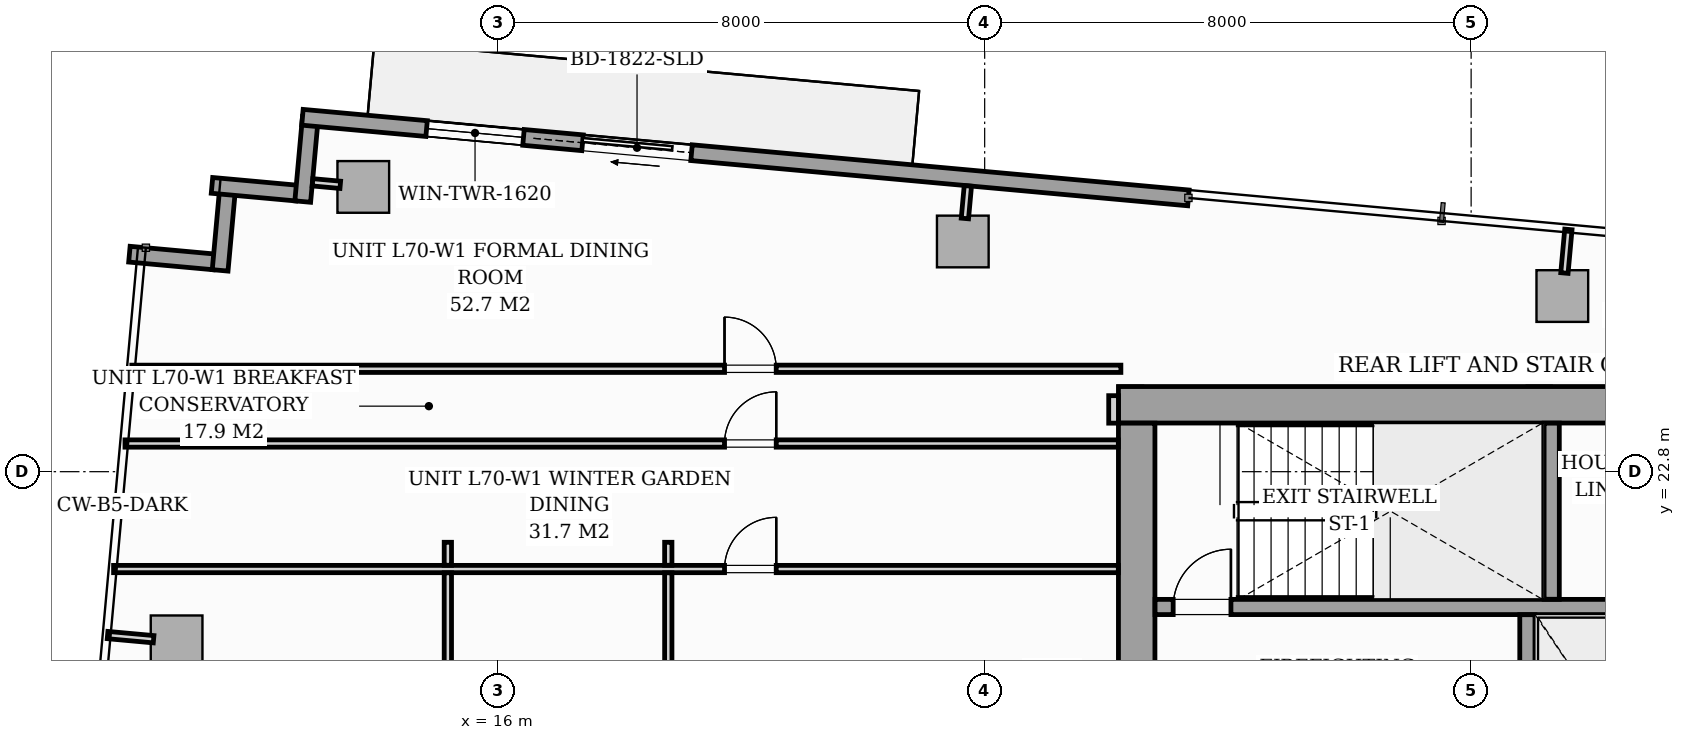
"""IFC4 building model, lengths in metres.
Left out: names, types, materials, properties, quantities, classifications, styles, units other than length and angle.
Written with IfcOpenShell. Run it as: python <this file> out.ifc"""

import sys

from ifc_helpers import new_model, si_unit, direction, frame, frame_2d, origin, origin_2d, place, context, subcontext, project, spatial, rectangle, i_section, extrude, source, transform, mapped, element, fill, save


model = new_model("IFC4")
c1 = context("Model", 3, precision=1e-05, world=origin(), true_north=direction((0.0, 1.0)))
c2 = subcontext(c1, "Body", "Model", "MODEL_VIEW")
j1 = project(units=[si_unit("LENGTHUNIT", "METRE"), si_unit("PLANEANGLEUNIT", "RADIAN")], contexts=[c1])
p1 = place(None, origin())
s1 = spatial("IfcSite", under=j1, at=p1, CompositionType="ELEMENT")
p2 = place(p1, origin())
s2 = spatial("IfcBuilding", under=s1, at=p2, CompositionType="ELEMENT")
p3 = place(p2, frame((0.0, 0.0, 243.0)))
s3 = spatial("IfcBuildingStorey", under=s2, at=p3, CompositionType="ELEMENT", Elevation=243.0)
m1 = source(origin(), c2, "Body", "SweptSolid", [
    extrude(i_section(OverallWidth=0.409, OverallDepth=0.425, WebThickness=0.033, FlangeThickness=0.052, FilletRadius=0.018, at=origin_2d()), origin(), (0.0, 0.0, 1.0), 3.296),
])
for number, where, z_axis, x_axis in (
    (1, (26.4, 24.0, 0.002), (0.0, 0.0, 1.0), (1.0, 0.0, 0.0)),
    (2, (33.12, 24.0, 0.002), (0.0, 0.0, 1.0), (1.0, 0.0, 0.0)),
):
    element("IfcColumn", number, at=place(p3, frame(where, z_axis=z_axis, x_axis=x_axis)), inside=s3, PredefinedType="PILASTER", context=c2, shape_type="MappedRepresentation", body=[
        mapped(m1, transform((0.0, 0.0, 0.0), scale=1.0)),
    ])
m2 = source(origin(), c2, "Body", "SweptSolid", [
    extrude(rectangle(XDim=0.85, YDim=0.85, at=origin_2d()), origin(), (0.0, 0.0, 1.0), 3.296),
])
for number, where, z_axis, x_axis in (
    (3, (13.781, 27.483, 0.002), (0.0, 0.0, 1.0), (0.996, -0.091, 0.0)),
    (4, (23.64, 26.585, 0.002), (0.0, 0.0, 1.0), (0.996, -0.091, 0.0)),
    (5, (33.5, 25.688, 0.002), (0.0, 0.0, 1.0), (0.996, -0.091, 0.0)),
    (6, (10.711, 20.01, 0.002), (0.0, 0.0, 1.0), (0.996, -0.091, 0.0)),
):
    element("IfcColumn", number, at=place(p3, frame(where, z_axis=z_axis, x_axis=x_axis)), inside=s3, PredefinedType="COLUMN", context=c2, shape_type="MappedRepresentation", body=[
        mapped(m2, transform((0.0, 0.0, 0.0), scale=1.0)),
    ])
for number, where, z_axis, x_axis in (
    (7, (9.935, 26.377, 0.0), (0.0, 0.0, 1.0), (0.996, -0.091, 0.0)),
    (8, (11.427, 26.111, 0.0), (0.0, 0.0, 1.0), (0.091, 0.996, 0.0)),
):
    element("IfcWall", number, at=place(p3, frame(where, z_axis=z_axis, x_axis=x_axis)), inside=s3, PredefinedType="STANDARD", context=c2, shape_type="SweptSolid", body=[
        extrude(rectangle(XDim=1.395, YDim=0.26, at=frame_2d((0.698, 0.0))), origin(), (0.0, 0.0, 1.0), 3.04),
    ])
p4 = place(p3, frame((11.293, 27.508, 0.0), z_axis=(0.0, 0.0, 1.0), x_axis=(0.995883159782, -0.090646191665, 0.0)))
e9 = element("IfcWall", 9, at=p4, inside=s3, PredefinedType="STANDARD", context=c2, shape_type="SweptSolid", body=[
    extrude(rectangle(XDim=1.395, YDim=0.26, at=frame_2d((0.698, 0.0))), origin(), (0.0, 0.0, 1.0), 3.04),
])
p5 = place(p3, frame((12.785, 27.242, 0.0), z_axis=(0.0, 0.0, 1.0), x_axis=(0.090472632758, 0.995898942023, 0.0)))
e10 = element("IfcWall", 10, at=p5, inside=s3, PredefinedType="STANDARD", context=c2, shape_type="SweptSolid", body=[
    extrude(rectangle(XDim=1.395, YDim=0.26, at=frame_2d((0.698, 0.0))), origin(), (0.0, 0.0, 1.0), 3.04),
])
p6 = place(p3, frame((12.781, 28.628, 0.0), z_axis=(0.0, 0.0, 1.0), x_axis=(0.995884584572, -0.090630536861, 0.0)))
e11 = element("IfcWall", 11, at=p6, inside=s3, PredefinedType="STANDARD", context=c2, shape_type="SweptSolid", body=[
    extrude(rectangle(XDim=14.63, YDim=0.26, at=frame_2d((7.315, 0.0))), origin(), (0.0, 0.0, 1.0), 3.04),
])
p7 = place(p6, frame((4.625, 0.0, 0.0)))
e12 = element("IfcOpeningElement", 12, at=p7, cuts=e11, PredefinedType="OPENING", context=c2, shape_type="SweptSolid", body=[
    extrude(rectangle(XDim=1.8, YDim=2.06, at=frame_2d((0.9, 1.03))), frame((0.0, 0.14, 0.0), z_axis=(0.0, -1.0, 0.0), x_axis=(1.0, 0.0, 0.0)), (0.0, 0.0, 1.0), 0.28),
])
p8 = place(p6, frame((2.05, 0.0, 0.65)))
e13 = element("IfcOpeningElement", 13, at=p8, cuts=e11, PredefinedType="OPENING", context=c2, shape_type="SweptSolid", body=[
    extrude(rectangle(XDim=1.6, YDim=1.5, at=frame_2d((0.8, 0.75))), frame((0.0, 0.14, 0.0), z_axis=(0.0, -1.0, 0.0), x_axis=(1.0, 0.0, 0.0)), (0.0, 0.0, 1.0), 0.28),
])
p9 = place(p3, frame((26.2, 23.9, 0.0), z_axis=(0.0, 0.0, 1.0), x_axis=(1.0, 0.0, 0.0)))
e14 = element("IfcWall", 14, at=p9, inside=s3, PredefinedType="SHEAR", context=c2, shape_type="SweptSolid", body=[
    extrude(rectangle(XDim=19.6, YDim=0.6, at=frame_2d((9.8, 0.0))), origin(), (0.0, 0.0, 1.0), 3.3),
])
p10 = place(p3, frame((26.5, 17.802, 0.0), z_axis=(0.0, 0.0, 1.0), x_axis=(0.0, 1.0, 0.0)))
e15 = element("IfcWall", 15, at=p10, inside=s3, PredefinedType="SHEAR", context=c2, shape_type="SweptSolid", body=[
    extrude(rectangle(XDim=5.796, YDim=0.6, at=frame_2d((2.898, 0.0))), origin(), (0.0, 0.0, 1.0), 3.3),
])
p11 = place(p3, frame((26.802, 20.575, 0.0), z_axis=(0.0, 0.0, 1.0), x_axis=(1.0, 0.0, 0.0)))
e16 = element("IfcWall", 16, at=p11, inside=s3, PredefinedType="SOLIDWALL", context=c2, shape_type="SweptSolid", body=[
    extrude(rectangle(XDim=8.148, YDim=0.25, at=frame_2d((4.074, 0.0))), origin(), (0.0, 0.0, 1.0), 3.3),
])
p12 = place(p11, frame((0.298, 0.0, 0.0)))
e17 = element("IfcOpeningElement", 17, at=p12, cuts=e16, PredefinedType="OPENING", context=c2, shape_type="SweptSolid", body=[
    extrude(rectangle(XDim=0.95, YDim=2.06, at=frame_2d((0.475, 1.03))), frame((0.0, 0.135, 0.0), z_axis=(0.0, -1.0, 0.0), x_axis=(1.0, 0.0, 0.0)), (0.0, 0.0, 1.0), 0.27),
])
p13 = place(p3, frame((33.325, 20.702, 0.0), z_axis=(0.0, 0.0, 1.0), x_axis=(0.0, 1.0, 0.0)))
e18 = element("IfcWall", 18, at=p13, inside=s3, PredefinedType="SOLIDWALL", context=c2, shape_type="SweptSolid", body=[
    extrude(rectangle(XDim=2.896, YDim=0.25, at=frame_2d((1.448, 0.0))), origin(), (0.0, 0.0, 1.0), 3.3),
])
p14 = place(p3, frame((32.925, 17.802, 0.0), z_axis=(0.0, 0.0, 1.0), x_axis=(0.0, 1.0, 0.0)))
e19 = element("IfcWall", 19, at=p14, inside=s3, PredefinedType="SOLIDWALL", context=c2, shape_type="SweptSolid", body=[
    extrude(rectangle(XDim=2.646, YDim=0.25, at=frame_2d((1.323, 0.0))), origin(), (0.0, 0.0, 1.0), 3.3),
])
p15 = place(p14, frame((0.548, 0.0, 0.0)))
e20 = element("IfcOpeningElement", 20, at=p15, cuts=e19, PredefinedType="OPENING", context=c2, shape_type="SweptSolid", body=[
    extrude(rectangle(XDim=1.1, YDim=2.08, at=frame_2d((0.55, 1.04))), frame((0.0, 0.135, 0.0), z_axis=(0.0, -1.0, 0.0), x_axis=(1.0, 0.0, 0.0)), (0.0, 0.0, 1.0), 0.27),
])
p16 = place(p3, frame((26.12, 23.598, 0.0), z_axis=(0.0, 0.0, 1.0), x_axis=(0.0, 1.0, 0.0)))
e21 = element("IfcWall", 21, at=p16, inside=s3, PredefinedType="PARTITIONING", context=c2, shape_type="SweptSolid", body=[
    extrude(rectangle(XDim=0.452, YDim=0.16, at=frame_2d((0.226, 0.0))), origin(), (0.0, 0.0, 1.0), 3.04),
])
p17 = place(p3, frame((9.975, 24.492, 0.0), z_axis=(0.0, 0.0, 1.0), x_axis=(1.0, 0.0, 0.0)))
e22 = element("IfcWall", 22, at=p17, inside=s3, PredefinedType="PARTITIONING", context=c2, shape_type="SweptSolid", body=[
    extrude(rectangle(XDim=16.265, YDim=0.12, at=frame_2d((8.133, 0.0))), origin(), (0.0, 0.0, 1.0), 3.04),
])
p18 = place(p17, frame((9.748, 0.0, 0.0)))
e23 = element("IfcOpeningElement", 23, at=p18, cuts=e22, PredefinedType="OPENING", context=c2, shape_type="SweptSolid", body=[
    extrude(rectangle(XDim=0.85, YDim=2.05, at=frame_2d((0.425, 1.025))), frame((0.0, 0.07, 0.0), z_axis=(0.0, -1.0, 0.0), x_axis=(1.0, 0.0, 0.0)), (0.0, 0.0, 1.0), 0.14),
])
p19 = place(p3, frame((9.863, 23.263, 0.0), z_axis=(0.0, 0.0, 1.0), x_axis=(1.0, 0.0, 0.0)))
e24 = element("IfcWall", 24, at=p19, inside=s3, PredefinedType="PARTITIONING", context=c2, shape_type="SweptSolid", body=[
    extrude(rectangle(XDim=16.335, YDim=0.12, at=frame_2d((8.168, 0.0))), origin(), (0.0, 0.0, 1.0), 3.04),
])
p20 = place(p19, frame((9.859, 0.0, 0.0)))
e25 = element("IfcOpeningElement", 25, at=p20, cuts=e24, PredefinedType="OPENING", context=c2, shape_type="SweptSolid", body=[
    extrude(rectangle(XDim=0.85, YDim=2.05, at=frame_2d((0.425, 1.025))), frame((0.0, 0.07, 0.0), z_axis=(0.0, -1.0, 0.0), x_axis=(1.0, 0.0, 0.0)), (0.0, 0.0, 1.0), 0.14),
])
p21 = place(p3, frame((9.675, 21.199, 0.0), z_axis=(0.0, 0.0, 1.0), x_axis=(1.0, 0.0, 0.0)))
e26 = element("IfcWall", 26, at=p21, inside=s3, PredefinedType="PARTITIONING", context=c2, shape_type="SweptSolid", body=[
    extrude(rectangle(XDim=16.523, YDim=0.12, at=frame_2d((8.262, 0.0))), origin(), (0.0, 0.0, 1.0), 3.04),
])
p22 = place(p21, frame((10.047, 0.0, 0.0)))
e27 = element("IfcOpeningElement", 27, at=p22, cuts=e26, PredefinedType="OPENING", context=c2, shape_type="SweptSolid", body=[
    extrude(rectangle(XDim=0.85, YDim=2.05, at=frame_2d((0.425, 1.025))), frame((0.0, 0.07, 0.0), z_axis=(0.0, -1.0, 0.0), x_axis=(1.0, 0.0, 0.0)), (0.0, 0.0, 1.0), 0.14),
])
p23 = place(p3, frame((15.172, 11.902, 0.0), z_axis=(0.0, 0.0, 1.0), x_axis=(0.0, 1.0, 0.0)))
e28 = element("IfcWall", 28, at=p23, inside=s3, PredefinedType="PARTITIONING", context=c2, shape_type="SweptSolid", body=[
    extrude(rectangle(XDim=9.235, YDim=0.12, at=frame_2d((4.617, 0.0))), origin(), (0.0, 0.0, 1.0), 3.04),
])
p24 = place(p23, frame((4.193, 0.0, 0.0)))
e29 = element("IfcOpeningElement", 29, at=p24, cuts=e28, PredefinedType="OPENING", context=c2, shape_type="SweptSolid", body=[
    extrude(rectangle(XDim=0.85, YDim=2.05, at=frame_2d((0.425, 1.025))), frame((0.0, 0.07, 0.0), z_axis=(0.0, -1.0, 0.0), x_axis=(1.0, 0.0, 0.0)), (0.0, 0.0, 1.0), 0.14),
])
p25 = place(p3, frame((15.172, 21.261, 0.0), z_axis=(0.0, 0.0, 1.0), x_axis=(0.0, 1.0, 0.0)))
e30 = element("IfcWall", 30, at=p25, inside=s3, PredefinedType="PARTITIONING", context=c2, shape_type="SweptSolid", body=[
    extrude(rectangle(XDim=0.378, YDim=0.12, at=frame_2d((0.189, 0.0))), origin(), (0.0, 0.0, 1.0), 3.04),
])
p26 = place(p3, frame((18.797, 11.902, 0.0), z_axis=(0.0, 0.0, 1.0), x_axis=(0.0, 1.0, 0.0)))
e31 = element("IfcWall", 31, at=p26, inside=s3, PredefinedType="PARTITIONING", context=c2, shape_type="SweptSolid", body=[
    extrude(rectangle(XDim=9.235, YDim=0.12, at=frame_2d((4.617, 0.0))), origin(), (0.0, 0.0, 1.0), 3.04),
])
p27 = place(p26, frame((4.193, 0.0, 0.0)))
e32 = element("IfcOpeningElement", 32, at=p27, cuts=e31, PredefinedType="OPENING", context=c2, shape_type="SweptSolid", body=[
    extrude(rectangle(XDim=0.85, YDim=2.05, at=frame_2d((0.425, 1.025))), frame((0.0, 0.07, 0.0), z_axis=(0.0, -1.0, 0.0), x_axis=(1.0, 0.0, 0.0)), (0.0, 0.0, 1.0), 0.14),
])
p28 = place(p3, frame((18.797, 21.261, 0.0), z_axis=(0.0, 0.0, 1.0), x_axis=(0.0, 1.0, 0.0)))
e33 = element("IfcWall", 33, at=p28, inside=s3, PredefinedType="PARTITIONING", context=c2, shape_type="SweptSolid", body=[
    extrude(rectangle(XDim=0.378, YDim=0.12, at=frame_2d((0.189, 0.0))), origin(), (0.0, 0.0, 1.0), 3.04),
])
p29 = place(p3, frame((13.403, 27.517, 0.0), z_axis=(0.0, 0.0, 1.0), x_axis=(-0.995884462012, 0.090631883588, 0.0)))
e34 = element("IfcWall", 34, at=p29, inside=s3, PredefinedType="PARTITIONING", context=c2, shape_type="SweptSolid", body=[
    extrude(rectangle(XDim=0.458, YDim=0.12, at=frame_2d((0.229, 0.0))), origin(), (0.0, 0.0, 1.0), 3.04),
])
p30 = place(p3, frame((23.675, 26.964, 0.0), z_axis=(0.0, 0.0, 1.0), x_axis=(0.090740281653, 0.995874591144, 0.0)))
e35 = element("IfcWall", 35, at=p30, inside=s3, PredefinedType="PARTITIONING", context=c2, shape_type="SweptSolid", body=[
    extrude(rectangle(XDim=0.538, YDim=0.12, at=frame_2d((0.269, 0.0))), origin(), (0.0, 0.0, 1.0), 3.04),
])
p31 = place(p3, frame((33.534, 26.067, 0.0), z_axis=(0.0, 0.0, 1.0), x_axis=(0.090535746043, 0.995893206468, 0.0)))
e36 = element("IfcWall", 36, at=p31, inside=s3, PredefinedType="PARTITIONING", context=c2, shape_type="SweptSolid", body=[
    extrude(rectangle(XDim=0.72, YDim=0.12, at=frame_2d((0.36, 0.0))), origin(), (0.0, 0.0, 1.0), 3.04),
])
p32 = place(p3, frame((10.333, 20.045, 0.0), z_axis=(0.0, 0.0, 1.0), x_axis=(-0.995890573658, 0.09056470228, 0.0)))
e37 = element("IfcWall", 37, at=p32, inside=s3, PredefinedType="PARTITIONING", context=c2, shape_type="SweptSolid", body=[
    extrude(rectangle(XDim=0.76, YDim=0.12, at=frame_2d((0.38, 0.0))), origin(), (0.0, 0.0, 1.0), 3.04),
])
m3 = source(origin(), c2, "Body", "SweptSolid", [
    extrude(rectangle(XDim=1.8, YDim=2.06, at=frame_2d((0.9, 1.03))), frame((0.0, 0.025, 0.0), z_axis=(0.0, -1.0, 0.0), x_axis=(1.0, 0.0, 0.0)), (0.0, 0.0, 1.0), 0.05),
])
p33 = place(p7, origin())
e38 = element("IfcDoor", 38, at=p33, inside=s3, OperationType="SLIDING_TO_LEFT", PredefinedType="DOOR", context=c2, shape_type="MappedRepresentation", body=[
    mapped(m3, transform((0.0, 0.0, 0.0), scale=1.0)),
])
fill(e12, e38)
m4 = source(origin(), c2, "Body", "SweptSolid", [
    extrude(rectangle(XDim=1.6, YDim=1.5, at=frame_2d((0.8, 0.75))), frame((0.0, 0.03, 0.0), z_axis=(0.0, -1.0, 0.0), x_axis=(1.0, 0.0, 0.0)), (0.0, 0.0, 1.0), 0.06),
])
p34 = place(p8, origin())
e39 = element("IfcWindow", 39, at=p34, inside=s3, PartitioningType="SINGLE_PANEL", PredefinedType="WINDOW", context=c2, shape_type="MappedRepresentation", body=[
    mapped(m4, transform((0.0, 0.0, 0.0), scale=1.0)),
])
fill(e13, e39)
m5 = source(origin(), c2, "Body", "SweptSolid", [
    extrude(rectangle(XDim=0.95, YDim=2.06, at=frame_2d((0.475, 1.03))), frame((0.0, 0.025, 0.0), z_axis=(0.0, -1.0, 0.0), x_axis=(1.0, 0.0, 0.0)), (0.0, 0.0, 1.0), 0.05),
])
p35 = place(p12, origin())
e40 = element("IfcDoor", 40, at=p35, inside=s3, OperationType="SINGLE_SWING_RIGHT", PredefinedType="DOOR", context=c2, shape_type="MappedRepresentation", body=[
    mapped(m5, transform((0.0, 0.0, 0.0), scale=1.0)),
])
fill(e17, e40)
m6 = source(origin(), c2, "Body", "SweptSolid", [
    extrude(rectangle(XDim=0.85, YDim=2.05, at=frame_2d((0.425, 1.025))), frame((0.0, 0.025, 0.0), z_axis=(0.0, -1.0, 0.0), x_axis=(1.0, 0.0, 0.0)), (0.0, 0.0, 1.0), 0.05),
])
p36 = place(p18, origin())
e41 = element("IfcDoor", 41, at=p36, inside=s3, OperationType="SINGLE_SWING_LEFT", PredefinedType="DOOR", context=c2, shape_type="MappedRepresentation", body=[
    mapped(m6, transform((0.0, 0.0, 0.0), scale=1.0)),
])
fill(e23, e41)
p37 = place(p20, origin())
e42 = element("IfcDoor", 42, at=p37, inside=s3, OperationType="SINGLE_SWING_RIGHT", PredefinedType="DOOR", context=c2, shape_type="MappedRepresentation", body=[
    mapped(m6, transform((0.0, 0.0, 0.0), scale=1.0)),
])
fill(e25, e42)
p38 = place(p22, origin())
e43 = element("IfcDoor", 43, at=p38, inside=s3, OperationType="SINGLE_SWING_RIGHT", PredefinedType="DOOR", context=c2, shape_type="MappedRepresentation", body=[
    mapped(m6, transform((0.0, 0.0, 0.0), scale=1.0)),
])
fill(e27, e43)
save(model, sys.argv[1])
